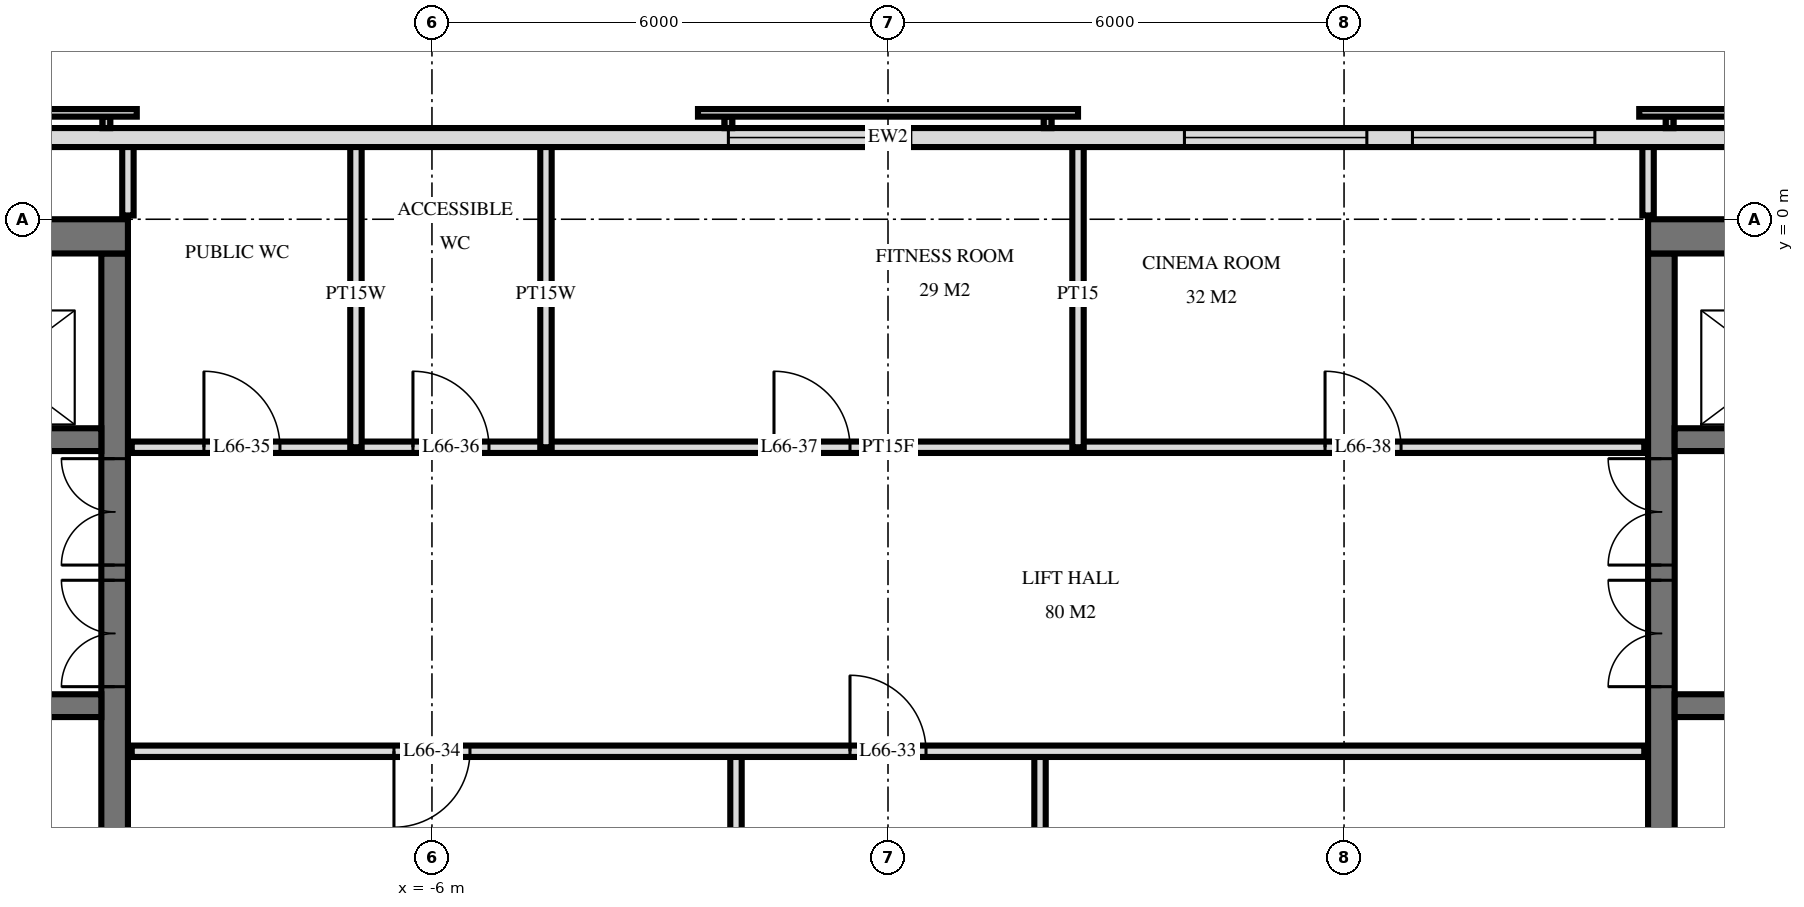
"""IFC4 building model, lengths in metres.
Left out: names, types, materials, properties, quantities, classifications, styles, units other than length and angle.
Written with IfcOpenShell. Run it as: python <this file> out.ifc"""

import sys

from ifc_helpers import new_model, si_unit, direction, frame, frame_2d, origin, place, context, subcontext, project, spatial, rectangle, extrude, element, fill, save


model = new_model("IFC4")
c1 = context("Model", 3, precision=1e-05, world=origin(), true_north=direction((0.0, 1.0)))
c2 = subcontext(c1, "Body", "Model", "MODEL_VIEW")
j1 = project(units=[si_unit("LENGTHUNIT", "METRE"), si_unit("PLANEANGLEUNIT", "RADIAN")], contexts=[c1])
p1 = place(None, origin())
s1 = spatial("IfcSite", under=j1, at=p1, CompositionType="ELEMENT")
p2 = place(p1, origin())
s2 = spatial("IfcBuilding", under=s1, at=p2, CompositionType="ELEMENT")
p3 = place(p2, frame((0.0, 0.0, 252.6)))
s3 = spatial("IfcBuildingStorey", under=s2, at=p3, CompositionType="ELEMENT", Elevation=252.6)
p4 = place(p3, frame((-19.5, -0.225, 0.0), z_axis=(0.0, 0.0, 1.0), x_axis=(1.0, 0.0, 0.0)))
e1 = element("IfcWall", 1, at=p4, inside=s3, PredefinedType="SHEAR", context=c2, shape_type="SweptSolid", body=[
    extrude(rectangle(XDim=9.5, YDim=0.45, at=frame_2d((4.75, 0.0))), origin(), (0.0, 0.0, 1.0), 3.5),
])
p5 = place(p3, frame((-10.175, -14.55, 0.0), z_axis=(0.0, 0.0, 1.0), x_axis=(0.0, 1.0, 0.0)))
e2 = element("IfcWall", 2, at=p5, inside=s3, PredefinedType="SHEAR", context=c2, shape_type="SweptSolid", body=[
    extrude(rectangle(XDim=14.1, YDim=0.35, at=frame_2d((7.05, 0.0))), origin(), (0.0, 0.0, 1.0), 3.5),
])
p6 = place(p5, frame((8.4, 0.0, 0.0)))
e3 = element("IfcOpeningElement", 3, at=p6, cuts=e2, PredefinedType="OPENING", context=c2, shape_type="SweptSolid", body=[
    extrude(rectangle(XDim=1.4, YDim=2.4, at=frame_2d((0.7, 1.2))), frame((0.0, 0.185, 0.0), z_axis=(0.0, -1.0, 0.0), x_axis=(1.0, 0.0, 0.0)), (0.0, 0.0, 1.0), 0.37),
])
p7 = place(p5, frame((10.0, 0.0, 0.0)))
e4 = element("IfcOpeningElement", 4, at=p7, cuts=e2, PredefinedType="OPENING", context=c2, shape_type="SweptSolid", body=[
    extrude(rectangle(XDim=1.4, YDim=2.4, at=frame_2d((0.7, 1.2))), frame((0.0, 0.185, 0.0), z_axis=(0.0, -1.0, 0.0), x_axis=(1.0, 0.0, 0.0)), (0.0, 0.0, 1.0), 0.37),
])
p8 = place(p5, frame((4.0, 0.0, 0.0)))
e5 = element("IfcOpeningElement", 5, at=p8, cuts=e2, PredefinedType="OPENING", context=c2, shape_type="SweptSolid", body=[
    extrude(rectangle(XDim=1.2, YDim=2.1, at=frame_2d((0.6, 1.05))), frame((0.0, 0.185, 0.0), z_axis=(0.0, -1.0, 0.0), x_axis=(1.0, 0.0, 0.0)), (0.0, 0.0, 1.0), 0.37),
])
p9 = place(p3, frame((-19.05, -2.9, 0.0), z_axis=(0.0, 0.0, 1.0), x_axis=(1.0, 0.0, 0.0)))
e6 = element("IfcWall", 6, at=p9, inside=s3, PredefinedType="SHEAR", context=c2, shape_type="SweptSolid", body=[
    extrude(rectangle(XDim=8.7, YDim=0.3, at=frame_2d((4.35, 0.0))), origin(), (0.0, 0.0, 1.0), 3.5),
])
p10 = place(p9, frame((6.8, 0.0, 0.0)))
e7 = element("IfcOpeningElement", 7, at=p10, cuts=e6, PredefinedType="OPENING", context=c2, shape_type="SweptSolid", body=[
    extrude(rectangle(XDim=1.1, YDim=2.1, at=frame_2d((0.55, 1.05))), frame((0.0, 0.16, 0.0), z_axis=(0.0, -1.0, 0.0), x_axis=(1.0, 0.0, 0.0)), (0.0, 0.0, 1.0), 0.32),
])
p11 = place(p9, frame((3.8, 0.0, 0.0)))
e8 = element("IfcOpeningElement", 8, at=p11, cuts=e6, PredefinedType="OPENING", context=c2, shape_type="SweptSolid", body=[
    extrude(rectangle(XDim=1.1, YDim=2.1, at=frame_2d((0.55, 1.05))), frame((0.0, 0.16, 0.0), z_axis=(0.0, -1.0, 0.0), x_axis=(1.0, 0.0, 0.0)), (0.0, 0.0, 1.0), 0.32),
])
p12 = place(p9, frame((1.863, 0.0, 0.0)))
e9 = element("IfcOpeningElement", 9, at=p12, cuts=e6, PredefinedType="OPENING", context=c2, shape_type="SweptSolid", body=[
    extrude(rectangle(XDim=0.9, YDim=2.1, at=frame_2d((0.45, 1.05))), frame((0.0, 0.16, 0.0), z_axis=(0.0, -1.0, 0.0), x_axis=(1.0, 0.0, 0.0)), (0.0, 0.0, 1.0), 0.32),
])
p13 = place(p9, frame((0.438, 0.0, 0.0)))
e10 = element("IfcOpeningElement", 10, at=p13, cuts=e6, PredefinedType="OPENING", context=c2, shape_type="SweptSolid", body=[
    extrude(rectangle(XDim=0.9, YDim=2.1, at=frame_2d((0.45, 1.05))), frame((0.0, 0.16, 0.0), z_axis=(0.0, -1.0, 0.0), x_axis=(1.0, 0.0, 0.0)), (0.0, 0.0, 1.0), 0.32),
])
p14 = place(p3, frame((-19.05, -6.4, 0.0), z_axis=(0.0, 0.0, 1.0), x_axis=(1.0, 0.0, 0.0)))
e11 = element("IfcWall", 11, at=p14, inside=s3, PredefinedType="SHEAR", context=c2, shape_type="SweptSolid", body=[
    extrude(rectangle(XDim=8.7, YDim=0.3, at=frame_2d((4.35, 0.0))), origin(), (0.0, 0.0, 1.0), 3.5),
])
p15 = place(p14, frame((0.8, 0.0, 0.0)))
e12 = element("IfcOpeningElement", 12, at=p15, cuts=e11, PredefinedType="OPENING", context=c2, shape_type="SweptSolid", body=[
    extrude(rectangle(XDim=1.1, YDim=2.1, at=frame_2d((0.55, 1.05))), frame((0.0, 0.16, 0.0), z_axis=(0.0, -1.0, 0.0), x_axis=(1.0, 0.0, 0.0)), (0.0, 0.0, 1.0), 0.32),
])
p16 = place(p3, frame((10.0, -0.225, 0.0), z_axis=(0.0, 0.0, 1.0), x_axis=(1.0, 0.0, 0.0)))
e13 = element("IfcWall", 13, at=p16, inside=s3, PredefinedType="SHEAR", context=c2, shape_type="SweptSolid", body=[
    extrude(rectangle(XDim=9.5, YDim=0.45, at=frame_2d((4.75, 0.0))), origin(), (0.0, 0.0, 1.0), 3.5),
])
p17 = place(p3, frame((10.175, -14.55, 0.0), z_axis=(0.0, 0.0, 1.0), x_axis=(0.0, 1.0, 0.0)))
e14 = element("IfcWall", 14, at=p17, inside=s3, PredefinedType="SHEAR", context=c2, shape_type="SweptSolid", body=[
    extrude(rectangle(XDim=14.1, YDim=0.35, at=frame_2d((7.05, 0.0))), origin(), (0.0, 0.0, 1.0), 3.5),
])
p18 = place(p17, frame((8.4, 0.0, 0.0)))
e15 = element("IfcOpeningElement", 15, at=p18, cuts=e14, PredefinedType="OPENING", context=c2, shape_type="SweptSolid", body=[
    extrude(rectangle(XDim=1.4, YDim=2.4, at=frame_2d((0.7, 1.2))), frame((0.0, 0.185, 0.0), z_axis=(0.0, -1.0, 0.0), x_axis=(1.0, 0.0, 0.0)), (0.0, 0.0, 1.0), 0.37),
])
p19 = place(p17, frame((10.0, 0.0, 0.0)))
e16 = element("IfcOpeningElement", 16, at=p19, cuts=e14, PredefinedType="OPENING", context=c2, shape_type="SweptSolid", body=[
    extrude(rectangle(XDim=1.4, YDim=2.4, at=frame_2d((0.7, 1.2))), frame((0.0, 0.185, 0.0), z_axis=(0.0, -1.0, 0.0), x_axis=(1.0, 0.0, 0.0)), (0.0, 0.0, 1.0), 0.37),
])
p20 = place(p17, frame((4.0, 0.0, 0.0)))
e17 = element("IfcOpeningElement", 17, at=p20, cuts=e14, PredefinedType="OPENING", context=c2, shape_type="SweptSolid", body=[
    extrude(rectangle(XDim=1.2, YDim=2.1, at=frame_2d((0.6, 1.05))), frame((0.0, 0.185, 0.0), z_axis=(0.0, -1.0, 0.0), x_axis=(1.0, 0.0, 0.0)), (0.0, 0.0, 1.0), 0.37),
])
p21 = place(p3, frame((10.35, -2.9, 0.0), z_axis=(0.0, 0.0, 1.0), x_axis=(1.0, 0.0, 0.0)))
e18 = element("IfcWall", 18, at=p21, inside=s3, PredefinedType="SHEAR", context=c2, shape_type="SweptSolid", body=[
    extrude(rectangle(XDim=8.7, YDim=0.3, at=frame_2d((4.35, 0.0))), origin(), (0.0, 0.0, 1.0), 3.5),
])
p22 = place(p21, frame((0.8, 0.0, 0.0)))
e19 = element("IfcOpeningElement", 19, at=p22, cuts=e18, PredefinedType="OPENING", context=c2, shape_type="SweptSolid", body=[
    extrude(rectangle(XDim=1.1, YDim=2.1, at=frame_2d((0.55, 1.05))), frame((0.0, 0.16, 0.0), z_axis=(0.0, -1.0, 0.0), x_axis=(1.0, 0.0, 0.0)), (0.0, 0.0, 1.0), 0.32),
])
p23 = place(p21, frame((3.8, 0.0, 0.0)))
e20 = element("IfcOpeningElement", 20, at=p23, cuts=e18, PredefinedType="OPENING", context=c2, shape_type="SweptSolid", body=[
    extrude(rectangle(XDim=1.1, YDim=2.1, at=frame_2d((0.55, 1.05))), frame((0.0, 0.16, 0.0), z_axis=(0.0, -1.0, 0.0), x_axis=(1.0, 0.0, 0.0)), (0.0, 0.0, 1.0), 0.32),
])
p24 = place(p21, frame((5.938, 0.0, 0.0)))
e21 = element("IfcOpeningElement", 21, at=p24, cuts=e18, PredefinedType="OPENING", context=c2, shape_type="SweptSolid", body=[
    extrude(rectangle(XDim=0.9, YDim=2.1, at=frame_2d((0.45, 1.05))), frame((0.0, 0.16, 0.0), z_axis=(0.0, -1.0, 0.0), x_axis=(1.0, 0.0, 0.0)), (0.0, 0.0, 1.0), 0.32),
])
p25 = place(p21, frame((7.363, 0.0, 0.0)))
e22 = element("IfcOpeningElement", 22, at=p25, cuts=e18, PredefinedType="OPENING", context=c2, shape_type="SweptSolid", body=[
    extrude(rectangle(XDim=0.9, YDim=2.1, at=frame_2d((0.45, 1.05))), frame((0.0, 0.16, 0.0), z_axis=(0.0, -1.0, 0.0), x_axis=(1.0, 0.0, 0.0)), (0.0, 0.0, 1.0), 0.32),
])
p26 = place(p3, frame((10.35, -6.4, 0.0), z_axis=(0.0, 0.0, 1.0), x_axis=(1.0, 0.0, 0.0)))
e23 = element("IfcWall", 23, at=p26, inside=s3, PredefinedType="SHEAR", context=c2, shape_type="SweptSolid", body=[
    extrude(rectangle(XDim=8.7, YDim=0.3, at=frame_2d((4.35, 0.0))), origin(), (0.0, 0.0, 1.0), 3.5),
])
p27 = place(p26, frame((6.8, 0.0, 0.0)))
e24 = element("IfcOpeningElement", 24, at=p27, cuts=e23, PredefinedType="OPENING", context=c2, shape_type="SweptSolid", body=[
    extrude(rectangle(XDim=1.1, YDim=2.1, at=frame_2d((0.55, 1.05))), frame((0.0, 0.16, 0.0), z_axis=(0.0, -1.0, 0.0), x_axis=(1.0, 0.0, 0.0)), (0.0, 0.0, 1.0), 0.32),
])
p28 = place(p3, frame((18.575, 1.075, 0.0), z_axis=(0.0, 0.0, 1.0), x_axis=(-1.0, 0.0, 0.0)))
e25 = element("IfcWall", 25, at=p28, inside=s3, PredefinedType="SOLIDWALL", context=c2, shape_type="SweptSolid", body=[
    extrude(rectangle(XDim=37.151, YDim=0.25, at=frame_2d((18.575, 0.0))), origin(), (0.0, 0.0, 1.0), 3.22),
])
p29 = place(p28, frame((9.275, 0.0, 0.9)))
e26 = element("IfcOpeningElement", 26, at=p29, cuts=e25, PredefinedType="OPENING", context=c2, shape_type="SweptSolid", body=[
    extrude(rectangle(XDim=2.4, YDim=1.5, at=frame_2d((1.2, 0.75))), frame((0.0, 0.135, 0.0), z_axis=(0.0, -1.0, 0.0), x_axis=(1.0, 0.0, 0.0)), (0.0, 0.0, 1.0), 0.27),
])
p30 = place(p28, frame((12.275, 0.0, 0.9)))
e27 = element("IfcOpeningElement", 27, at=p30, cuts=e25, PredefinedType="OPENING", context=c2, shape_type="SweptSolid", body=[
    extrude(rectangle(XDim=2.4, YDim=1.5, at=frame_2d((1.2, 0.75))), frame((0.0, 0.135, 0.0), z_axis=(0.0, -1.0, 0.0), x_axis=(1.0, 0.0, 0.0)), (0.0, 0.0, 1.0), 0.27),
])
p31 = place(p28, frame((18.275, 0.0, 0.9)))
e28 = element("IfcOpeningElement", 28, at=p31, cuts=e25, PredefinedType="OPENING", context=c2, shape_type="SweptSolid", body=[
    extrude(rectangle(XDim=2.4, YDim=1.5, at=frame_2d((1.2, 0.75))), frame((0.0, 0.135, 0.0), z_axis=(0.0, -1.0, 0.0), x_axis=(1.0, 0.0, 0.0)), (0.0, 0.0, 1.0), 0.27),
])
p32 = place(p3, frame((10.0, 0.05, 0.0), z_axis=(0.0, 0.0, 1.0), x_axis=(0.0, 1.0, 0.0)))
e29 = element("IfcWall", 29, at=p32, inside=s3, PredefinedType="PARTITIONING", context=c2, shape_type="SweptSolid", body=[
    extrude(rectangle(XDim=0.97, YDim=0.15, at=frame_2d((0.485, 0.0))), origin(), (0.0, 0.0, 1.0), 3.22),
])
p33 = place(p3, frame((2.5, -3.0, 0.0), z_axis=(0.0, 0.0, 1.0), x_axis=(0.0, 1.0, 0.0)))
e30 = element("IfcWall", 30, at=p33, inside=s3, PredefinedType="PARTITIONING", context=c2, shape_type="SweptSolid", body=[
    extrude(rectangle(XDim=4.02, YDim=0.15, at=frame_2d((2.01, 0.0))), origin(), (0.0, 0.0, 1.0), 3.22),
])
for number, where, z_axis, x_axis in (
    (31, (2.0, -11.0, 0.0), (0.0, 0.0, 1.0), (0.0, 1.0, 0.0)),
    (32, (-2.0, -11.0, 0.0), (0.0, 0.0, 1.0), (0.0, 1.0, 0.0)),
):
    element("IfcWall", number, at=place(p3, frame(where, z_axis=z_axis, x_axis=x_axis)), inside=s3, PredefinedType="PARTITIONING", context=c2, shape_type="SweptSolid", body=[
        extrude(rectangle(XDim=4.0, YDim=0.15, at=frame_2d((2.0, 0.0))), origin(), (0.0, 0.0, 1.0), 3.22),
    ])
for number, where, z_axis, x_axis in (
    (33, (-4.5, -3.0, 0.0), (0.0, 0.0, 1.0), (0.0, 1.0, 0.0)),
    (34, (-7.0, -3.0, 0.0), (0.0, 0.0, 1.0), (0.0, 1.0, 0.0)),
):
    element("IfcWall", number, at=place(p3, frame(where, z_axis=z_axis, x_axis=x_axis)), inside=s3, PredefinedType="PLUMBINGWALL", context=c2, shape_type="SweptSolid", body=[
        extrude(rectangle(XDim=4.02, YDim=0.15, at=frame_2d((2.01, 0.0))), origin(), (0.0, 0.0, 1.0), 3.22),
    ])
p34 = place(p3, frame((-10.0, 0.05, 0.0), z_axis=(0.0, 0.0, 1.0), x_axis=(0.0, 1.0, 0.0)))
e35 = element("IfcWall", 35, at=p34, inside=s3, PredefinedType="PLUMBINGWALL", context=c2, shape_type="SweptSolid", body=[
    extrude(rectangle(XDim=0.97, YDim=0.15, at=frame_2d((0.485, 0.0))), origin(), (0.0, 0.0, 1.0), 3.22),
])
p35 = place(p3, frame((-9.95, -7.0, 0.0), z_axis=(0.0, 0.0, 1.0), x_axis=(1.0, 0.0, 0.0)))
e36 = element("IfcWall", 36, at=p35, inside=s3, PredefinedType="PARTITIONING", context=c2, shape_type="SweptSolid", body=[
    extrude(rectangle(XDim=19.9, YDim=0.15, at=frame_2d((9.95, 0.0))), origin(), (0.0, 0.0, 1.0), 3.22),
])
p36 = place(p35, frame((9.45, 0.0, 0.0)))
e37 = element("IfcOpeningElement", 37, at=p36, cuts=e36, PredefinedType="OPENING", context=c2, shape_type="SweptSolid", body=[
    extrude(rectangle(XDim=1.0, YDim=2.1, at=frame_2d((0.5, 1.05))), frame((0.0, 0.085, 0.0), z_axis=(0.0, -1.0, 0.0), x_axis=(1.0, 0.0, 0.0)), (0.0, 0.0, 1.0), 0.17),
])
p37 = place(p35, frame((3.45, 0.0, 0.0)))
e38 = element("IfcOpeningElement", 38, at=p37, cuts=e36, PredefinedType="OPENING", context=c2, shape_type="SweptSolid", body=[
    extrude(rectangle(XDim=1.0, YDim=2.1, at=frame_2d((0.5, 1.05))), frame((0.0, 0.085, 0.0), z_axis=(0.0, -1.0, 0.0), x_axis=(1.0, 0.0, 0.0)), (0.0, 0.0, 1.0), 0.17),
])
p38 = place(p3, frame((-9.95, -3.0, 0.0), z_axis=(0.0, 0.0, 1.0), x_axis=(1.0, 0.0, 0.0)))
e39 = element("IfcWall", 39, at=p38, inside=s3, PredefinedType="PARTITIONING", context=c2, shape_type="SweptSolid", body=[
    extrude(rectangle(XDim=19.9, YDim=0.15, at=frame_2d((9.95, 0.0))), origin(), (0.0, 0.0, 1.0), 3.22),
])
p39 = place(p38, frame((0.95, 0.0, 0.0)))
e40 = element("IfcOpeningElement", 40, at=p39, cuts=e39, PredefinedType="OPENING", context=c2, shape_type="SweptSolid", body=[
    extrude(rectangle(XDim=1.0, YDim=2.1, at=frame_2d((0.5, 1.05))), frame((0.0, 0.085, 0.0), z_axis=(0.0, -1.0, 0.0), x_axis=(1.0, 0.0, 0.0)), (0.0, 0.0, 1.0), 0.17),
])
p40 = place(p38, frame((3.7, 0.0, 0.0)))
e41 = element("IfcOpeningElement", 41, at=p40, cuts=e39, PredefinedType="OPENING", context=c2, shape_type="SweptSolid", body=[
    extrude(rectangle(XDim=1.0, YDim=2.1, at=frame_2d((0.5, 1.05))), frame((0.0, 0.085, 0.0), z_axis=(0.0, -1.0, 0.0), x_axis=(1.0, 0.0, 0.0)), (0.0, 0.0, 1.0), 0.17),
])
p41 = place(p38, frame((8.45, 0.0, 0.0)))
e42 = element("IfcOpeningElement", 42, at=p41, cuts=e39, PredefinedType="OPENING", context=c2, shape_type="SweptSolid", body=[
    extrude(rectangle(XDim=1.0, YDim=2.1, at=frame_2d((0.5, 1.05))), frame((0.0, 0.085, 0.0), z_axis=(0.0, -1.0, 0.0), x_axis=(1.0, 0.0, 0.0)), (0.0, 0.0, 1.0), 0.17),
])
p42 = place(p38, frame((15.7, 0.0, 0.0)))
e43 = element("IfcOpeningElement", 43, at=p42, cuts=e39, PredefinedType="OPENING", context=c2, shape_type="SweptSolid", body=[
    extrude(rectangle(XDim=1.0, YDim=2.1, at=frame_2d((0.5, 1.05))), frame((0.0, 0.085, 0.0), z_axis=(0.0, -1.0, 0.0), x_axis=(1.0, 0.0, 0.0)), (0.0, 0.0, 1.0), 0.17),
])
p43 = place(p29, origin())
e44 = element("IfcWindow", 44, at=p43, inside=s3, PartitioningType="SINGLE_PANEL", PredefinedType="WINDOW", context=c2, shape_type="SweptSolid", body=[
    extrude(rectangle(XDim=2.4, YDim=1.5, at=frame_2d((1.2, 0.75))), frame((0.0, 0.03, 0.0), z_axis=(0.0, -1.0, 0.0), x_axis=(1.0, 0.0, 0.0)), (0.0, 0.0, 1.0), 0.06),
])
fill(e26, e44)
p44 = place(p30, origin())
e45 = element("IfcWindow", 45, at=p44, inside=s3, PartitioningType="SINGLE_PANEL", PredefinedType="WINDOW", context=c2, shape_type="SweptSolid", body=[
    extrude(rectangle(XDim=2.4, YDim=1.5, at=frame_2d((1.2, 0.75))), frame((0.0, 0.03, 0.0), z_axis=(0.0, -1.0, 0.0), x_axis=(1.0, 0.0, 0.0)), (0.0, 0.0, 1.0), 0.06),
])
fill(e27, e45)
p45 = place(p31, origin())
e46 = element("IfcWindow", 46, at=p45, inside=s3, PartitioningType="SINGLE_PANEL", PredefinedType="WINDOW", context=c2, shape_type="SweptSolid", body=[
    extrude(rectangle(XDim=2.4, YDim=1.5, at=frame_2d((1.2, 0.75))), frame((0.0, 0.03, 0.0), z_axis=(0.0, -1.0, 0.0), x_axis=(1.0, 0.0, 0.0)), (0.0, 0.0, 1.0), 0.06),
])
fill(e28, e46)
p46 = place(p6, origin())
e47 = element("IfcDoor", 47, at=p46, inside=s3, OperationType="DOUBLE_DOOR_SINGLE_SWING", PredefinedType="DOOR", context=c2, shape_type="SweptSolid", body=[
    extrude(rectangle(XDim=1.4, YDim=2.4, at=frame_2d((0.7, 1.2))), frame((0.0, 0.025, 0.0), z_axis=(0.0, -1.0, 0.0), x_axis=(1.0, 0.0, 0.0)), (0.0, 0.0, 1.0), 0.05),
])
fill(e3, e47)
p47 = place(p7, origin())
e48 = element("IfcDoor", 48, at=p47, inside=s3, OperationType="DOUBLE_DOOR_SINGLE_SWING", PredefinedType="DOOR", context=c2, shape_type="SweptSolid", body=[
    extrude(rectangle(XDim=1.4, YDim=2.4, at=frame_2d((0.7, 1.2))), frame((0.0, 0.025, 0.0), z_axis=(0.0, -1.0, 0.0), x_axis=(1.0, 0.0, 0.0)), (0.0, 0.0, 1.0), 0.05),
])
fill(e4, e48)
p48 = place(p18, origin())
e49 = element("IfcDoor", 49, at=p48, inside=s3, OperationType="DOUBLE_DOOR_SINGLE_SWING", PredefinedType="DOOR", context=c2, shape_type="SweptSolid", body=[
    extrude(rectangle(XDim=1.4, YDim=2.4, at=frame_2d((0.7, 1.2))), frame((0.0, 0.025, 0.0), z_axis=(0.0, -1.0, 0.0), x_axis=(1.0, 0.0, 0.0)), (0.0, 0.0, 1.0), 0.05),
])
fill(e15, e49)
p49 = place(p19, origin())
e50 = element("IfcDoor", 50, at=p49, inside=s3, OperationType="DOUBLE_DOOR_SINGLE_SWING", PredefinedType="DOOR", context=c2, shape_type="SweptSolid", body=[
    extrude(rectangle(XDim=1.4, YDim=2.4, at=frame_2d((0.7, 1.2))), frame((0.0, 0.025, 0.0), z_axis=(0.0, -1.0, 0.0), x_axis=(1.0, 0.0, 0.0)), (0.0, 0.0, 1.0), 0.05),
])
fill(e16, e50)
p50 = place(p36, origin())
e51 = element("IfcDoor", 51, at=p50, inside=s3, OperationType="SINGLE_SWING_RIGHT", PredefinedType="DOOR", context=c2, shape_type="SweptSolid", body=[
    extrude(rectangle(XDim=1.0, YDim=2.1, at=frame_2d((0.5, 1.05))), frame((0.0, 0.025, 0.0), z_axis=(0.0, -1.0, 0.0), x_axis=(1.0, 0.0, 0.0)), (0.0, 0.0, 1.0), 0.05),
])
fill(e37, e51)
p51 = place(p37, frame((0.5, 0.0, 0.0), z_axis=(0.0, 0.0, 1.0), x_axis=(-1.0, 0.0, 0.0)))
e52 = element("IfcDoor", 52, at=p51, inside=s3, OperationType="SINGLE_SWING_LEFT", PredefinedType="DOOR", context=c2, shape_type="SweptSolid", body=[
    extrude(rectangle(XDim=1.0, YDim=2.1, at=frame_2d((0.0, 1.05))), frame((0.0, -0.025, 0.0), z_axis=(0.0, 1.0, 0.0), x_axis=(-1.0, 0.0, 0.0)), (0.0, 0.0, 1.0), 0.05),
])
fill(e38, e52)
p52 = place(p39, origin())
e53 = element("IfcDoor", 53, at=p52, inside=s3, OperationType="SINGLE_SWING_RIGHT", PredefinedType="DOOR", context=c2, shape_type="SweptSolid", body=[
    extrude(rectangle(XDim=1.0, YDim=2.1, at=frame_2d((0.5, 1.05))), frame((0.0, 0.025, 0.0), z_axis=(0.0, -1.0, 0.0), x_axis=(1.0, 0.0, 0.0)), (0.0, 0.0, 1.0), 0.05),
])
fill(e40, e53)
p53 = place(p40, origin())
e54 = element("IfcDoor", 54, at=p53, inside=s3, OperationType="SINGLE_SWING_RIGHT", PredefinedType="DOOR", context=c2, shape_type="SweptSolid", body=[
    extrude(rectangle(XDim=1.0, YDim=2.1, at=frame_2d((0.5, 1.05))), frame((0.0, 0.025, 0.0), z_axis=(0.0, -1.0, 0.0), x_axis=(1.0, 0.0, 0.0)), (0.0, 0.0, 1.0), 0.05),
])
fill(e41, e54)
p54 = place(p41, origin())
e55 = element("IfcDoor", 55, at=p54, inside=s3, OperationType="SINGLE_SWING_RIGHT", PredefinedType="DOOR", context=c2, shape_type="SweptSolid", body=[
    extrude(rectangle(XDim=1.0, YDim=2.1, at=frame_2d((0.5, 1.05))), frame((0.0, 0.025, 0.0), z_axis=(0.0, -1.0, 0.0), x_axis=(1.0, 0.0, 0.0)), (0.0, 0.0, 1.0), 0.05),
])
fill(e42, e55)
p55 = place(p42, origin())
e56 = element("IfcDoor", 56, at=p55, inside=s3, OperationType="SINGLE_SWING_RIGHT", PredefinedType="DOOR", context=c2, shape_type="SweptSolid", body=[
    extrude(rectangle(XDim=1.0, YDim=2.1, at=frame_2d((0.5, 1.05))), frame((0.0, 0.025, 0.0), z_axis=(0.0, -1.0, 0.0), x_axis=(1.0, 0.0, 0.0)), (0.0, 0.0, 1.0), 0.05),
])
fill(e43, e56)
save(model, sys.argv[1])
